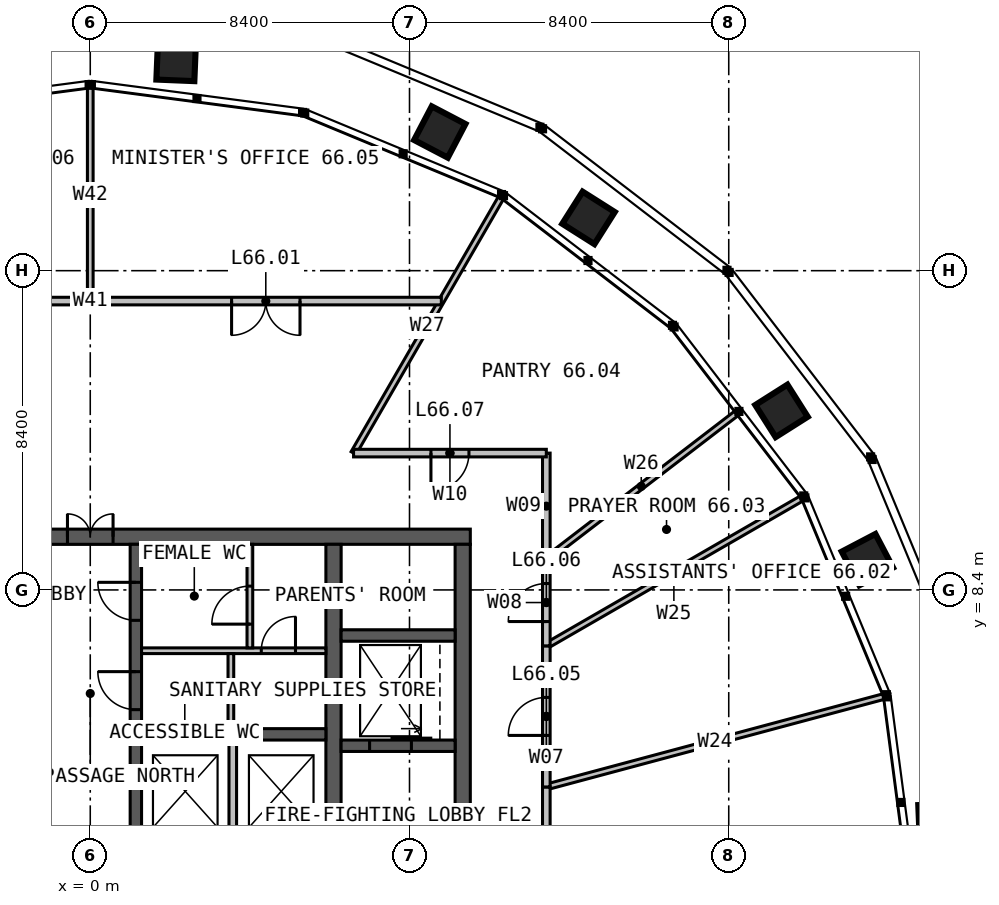
"""IFC4 building model, lengths in metres.
Left out: names, types, materials, properties, quantities, classifications, styles, units other than length and angle.
Written with IfcOpenShell. Run it as: python <this file> out.ifc"""

import sys

from ifc_helpers import new_model, si_unit, direction, frame, frame_2d, origin, place, context, subcontext, project, spatial, rectangle, extrude, element, fill, save


model = new_model("IFC4")
c1 = context("Model", 3, precision=1e-05, world=origin(), true_north=direction((0.0, 1.0)))
c2 = subcontext(c1, "Body", "Model", "MODEL_VIEW")
j1 = project(units=[si_unit("LENGTHUNIT", "METRE"), si_unit("PLANEANGLEUNIT", "RADIAN")], contexts=[c1])
p1 = place(None, origin())
s1 = spatial("IfcSite", under=j1, at=p1, CompositionType="ELEMENT")
p2 = place(p1, origin())
s2 = spatial("IfcBuilding", under=s1, at=p2, CompositionType="ELEMENT")
p3 = place(p2, frame((0.0, 0.0, 272.0)))
s3 = spatial("IfcBuildingStorey", under=s2, at=p3, CompositionType="ELEMENT", Elevation=272.0)
p4 = place(p3, frame((-10.0, 9.8, 0.0), z_axis=(0.0, 0.0, 1.0), x_axis=(1.0, 0.0, 0.0)))
e1 = element("IfcWall", 1, at=p4, inside=s3, PredefinedType="SOLIDWALL", context=c2, shape_type="SweptSolid", body=[
    extrude(rectangle(XDim=20.0, YDim=0.4, at=frame_2d((10.0, 0.0))), origin(), (0.0, 0.0, 1.0), 4.0),
])
p5 = place(p4, frame((9.4, 0.0, 0.0)))
e2 = element("IfcOpeningElement", 2, at=p5, cuts=e1, PredefinedType="OPENING", context=c2, shape_type="SweptSolid", body=[
    extrude(rectangle(XDim=1.2, YDim=2.2, at=frame_2d((0.6, 1.1))), frame((0.0, 0.21, 0.0), z_axis=(0.0, -1.0, 0.0), x_axis=(1.0, 0.0, 0.0)), (0.0, 0.0, 1.0), 0.42),
])
p6 = place(p3, frame((9.8, -9.6, 0.0), z_axis=(0.0, 0.0, 1.0), x_axis=(0.0, 1.0, 0.0)))
e3 = element("IfcWall", 3, at=p6, inside=s3, PredefinedType="SOLIDWALL", context=c2, shape_type="SweptSolid", body=[
    extrude(rectangle(XDim=19.2, YDim=0.4, at=frame_2d((9.6, 0.0))), origin(), (0.0, 0.0, 1.0), 4.0),
])
p7 = place(p3, frame((6.4, 9.6, 0.0), z_axis=(0.0, 0.0, 1.0), x_axis=(0.0, -1.0, 0.0)))
e4 = element("IfcWall", 4, at=p7, inside=s3, PredefinedType="SOLIDWALL", context=c2, shape_type="SweptSolid", body=[
    extrude(rectangle(XDim=19.2, YDim=0.4, at=frame_2d((9.6, 0.0))), origin(), (0.0, 0.0, 1.0), 4.0),
])
p8 = place(p7, frame((9.1, 0.0, 0.0)))
e5 = element("IfcOpeningElement", 5, at=p8, cuts=e4, PredefinedType="OPENING", context=c2, shape_type="SweptSolid", body=[
    extrude(rectangle(XDim=1.0, YDim=2.2, at=frame_2d((0.5, 1.1))), frame((0.0, 0.21, 0.0), z_axis=(0.0, -1.0, 0.0), x_axis=(1.0, 0.0, 0.0)), (0.0, 0.0, 1.0), 0.42),
])
p9 = place(p3, frame((1.35, 4.6, 0.0), z_axis=(0.0, 0.0, 1.0), x_axis=(1.0, 0.0, 0.0)))
e6 = element("IfcWall", 6, at=p9, inside=s3, PredefinedType="SOLIDWALL", context=c2, shape_type="SweptSolid", body=[
    extrude(rectangle(XDim=4.85, YDim=0.3, at=frame_2d((2.425, 0.0))), origin(), (0.0, 0.0, 1.0), 4.0),
])
p10 = place(p3, frame((1.2, 1.45, 0.0), z_axis=(0.0, 0.0, 1.0), x_axis=(0.0, 1.0, 0.0)))
e7 = element("IfcWall", 7, at=p10, inside=s3, PredefinedType="SOLIDWALL", context=c2, shape_type="SweptSolid", body=[
    extrude(rectangle(XDim=8.15, YDim=0.3, at=frame_2d((4.075, 0.0))), origin(), (0.0, 0.0, 1.0), 4.0),
])
p11 = place(p10, frame((3.8, 0.0, 0.0)))
e8 = element("IfcOpeningElement", 8, at=p11, cuts=e7, PredefinedType="OPENING", context=c2, shape_type="SweptSolid", body=[
    extrude(rectangle(XDim=1.0, YDim=2.2, at=frame_2d((0.5, 1.1))), frame((0.0, 0.16, 0.0), z_axis=(0.0, -1.0, 0.0), x_axis=(1.0, 0.0, 0.0)), (0.0, 0.0, 1.0), 0.32),
])
p12 = place(p10, frame((6.15, 0.0, 0.0)))
e9 = element("IfcOpeningElement", 9, at=p12, cuts=e7, PredefinedType="OPENING", context=c2, shape_type="SweptSolid", body=[
    extrude(rectangle(XDim=1.0, YDim=2.2, at=frame_2d((0.5, 1.1))), frame((0.0, 0.16, 0.0), z_axis=(0.0, -1.0, 0.0), x_axis=(1.0, 0.0, 0.0)), (0.0, 0.0, 1.0), 0.32),
])
p13 = place(p3, frame((6.6, 4.3, 0.0), z_axis=(0.0, 0.0, 1.0), x_axis=(1.0, 0.0, 0.0)))
e10 = element("IfcWall", 10, at=p13, inside=s3, PredefinedType="SOLIDWALL", context=c2, shape_type="SweptSolid", body=[
    extrude(rectangle(XDim=3.0, YDim=0.3, at=frame_2d((1.5, 0.0))), origin(), (0.0, 0.0, 1.0), 4.0),
])
p14 = place(p13, frame((0.75, 0.0, 0.0)))
e11 = element("IfcOpeningElement", 11, at=p14, cuts=e10, PredefinedType="OPENING", context=c2, shape_type="SweptSolid", body=[
    extrude(rectangle(XDim=1.1, YDim=2.2, at=frame_2d((0.55, 1.1))), frame((0.0, 0.16, 0.0), z_axis=(0.0, -1.0, 0.0), x_axis=(1.0, 0.0, 0.0)), (0.0, 0.0, 1.0), 0.32),
])
p15 = place(p3, frame((6.6, 7.2, 0.0), z_axis=(0.0, 0.0, 1.0), x_axis=(1.0, 0.0, 0.0)))
e12 = element("IfcWall", 12, at=p15, inside=s3, PredefinedType="SOLIDWALL", context=c2, shape_type="SweptSolid", body=[
    extrude(rectangle(XDim=3.0, YDim=0.3, at=frame_2d((1.5, 0.0))), origin(), (0.0, 0.0, 1.0), 4.0),
])
p16 = place(p3, frame((3.75, 1.75, 0.0), z_axis=(0.0, 0.0, 1.0), x_axis=(0.0, 1.0, 0.0)))
e13 = element("IfcWall", 13, at=p16, inside=s3, PredefinedType="SOLIDWALL", context=c2, shape_type="SweptSolid", body=[
    extrude(rectangle(XDim=2.7, YDim=0.2, at=frame_2d((1.35, 0.0))), origin(), (0.0, 0.0, 1.0), 3.75),
])
p17 = place(p3, frame((1.35, 6.8, 0.0), z_axis=(0.0, 0.0, 1.0), x_axis=(1.0, 0.0, 0.0)))
e14 = element("IfcWall", 14, at=p17, inside=s3, PredefinedType="PARTITIONING", context=c2, shape_type="SweptSolid", body=[
    extrude(rectangle(XDim=4.85, YDim=0.15, at=frame_2d((2.425, 0.0))), origin(), (0.0, 0.0, 1.0), 3.75),
])
p18 = place(p17, frame((3.15, 0.0, 0.0)))
e15 = element("IfcOpeningElement", 15, at=p18, cuts=e14, PredefinedType="OPENING", context=c2, shape_type="SweptSolid", body=[
    extrude(rectangle(XDim=0.9, YDim=2.2, at=frame_2d((0.45, 1.1))), frame((0.0, 0.085, 0.0), z_axis=(0.0, -1.0, 0.0), x_axis=(1.0, 0.0, 0.0)), (0.0, 0.0, 1.0), 0.17),
])
p19 = place(p3, frame((3.7, 4.75, 0.0), z_axis=(0.0, 0.0, 1.0), x_axis=(0.0, 1.0, 0.0)))
e16 = element("IfcWall", 16, at=p19, inside=s3, PredefinedType="PARTITIONING", context=c2, shape_type="SweptSolid", body=[
    extrude(rectangle(XDim=1.975, YDim=0.15, at=frame_2d((0.988, 0.0))), origin(), (0.0, 0.0, 1.0), 3.75),
])
p20 = place(p3, frame((4.2, 6.875, 0.0), z_axis=(0.0, 0.0, 1.0), x_axis=(0.0, 1.0, 0.0)))
e17 = element("IfcWall", 17, at=p20, inside=s3, PredefinedType="PARTITIONING", context=c2, shape_type="SweptSolid", body=[
    extrude(rectangle(XDim=2.725, YDim=0.15, at=frame_2d((1.363, 0.0))), origin(), (0.0, 0.0, 1.0), 3.75),
])
p21 = place(p20, frame((0.625, 0.0, 0.0)))
e18 = element("IfcOpeningElement", 18, at=p21, cuts=e17, PredefinedType="OPENING", context=c2, shape_type="SweptSolid", body=[
    extrude(rectangle(XDim=1.0, YDim=2.2, at=frame_2d((0.5, 1.1))), frame((0.0, 0.085, 0.0), z_axis=(0.0, -1.0, 0.0), x_axis=(1.0, 0.0, 0.0)), (0.0, 0.0, 1.0), 0.17),
])
p22 = place(p3, frame((12.0, 3.215, 0.0), z_axis=(0.0, 0.0, 1.0), x_axis=(0.965925864192, 0.258818903647, 0.0)))
e19 = element("IfcWall", 19, at=p22, inside=s3, PredefinedType="PARTITIONING", context=c2, shape_type="SweptSolid", body=[
    extrude(rectangle(XDim=9.185, YDim=0.15, at=frame_2d((4.592, 0.0))), origin(), (0.0, 0.0, 1.0), 2.79),
])
p23 = place(p3, frame((12.0, 6.928, 0.0), z_axis=(0.0, 0.0, 1.0), x_axis=(0.866025099701, 0.500000526688, 0.0)))
e20 = element("IfcWall", 20, at=p23, inside=s3, PredefinedType="PARTITIONING", context=c2, shape_type="SweptSolid", body=[
    extrude(rectangle(XDim=7.752, YDim=0.15, at=frame_2d((3.876, 0.0))), origin(), (0.0, 0.0, 1.0), 2.79),
])
p24 = place(p3, frame((12.0, 9.208, 0.0), z_axis=(0.0, 0.0, 1.0), x_axis=(0.793359833503, 0.608752966797, 0.0)))
e21 = element("IfcWall", 21, at=p24, inside=s3, PredefinedType="PARTITIONING", context=c2, shape_type="SweptSolid", body=[
    extrude(rectangle(XDim=6.298, YDim=0.15, at=frame_2d((3.149, 0.0))), origin(), (0.0, 0.0, 1.0), 2.79),
])
p25 = place(p3, frame((6.928, 12.0, 0.0), z_axis=(0.0, 0.0, 1.0), x_axis=(0.500000526688, 0.866025099701, 0.0)))
e22 = element("IfcWall", 22, at=p25, inside=s3, PredefinedType="PARTITIONING", context=c2, shape_type="SweptSolid", body=[
    extrude(rectangle(XDim=7.752, YDim=0.15, at=frame_2d((3.876, 0.0))), origin(), (0.0, 0.0, 1.0), 2.79),
])
p26 = place(p3, frame((12.0, -6.928, 0.0), z_axis=(0.0, 0.0, 1.0), x_axis=(0.0, 1.0, 0.0)))
e23 = element("IfcWall", 23, at=p26, inside=s3, PredefinedType="PARTITIONING", context=c2, shape_type="SweptSolid", body=[
    extrude(rectangle(XDim=10.144, YDim=0.2, at=frame_2d((5.072, 0.0))), origin(), (0.0, 0.0, 1.0), 3.8),
])
p27 = place(p26, frame((4.172, 0.0, 0.0)))
e24 = element("IfcOpeningElement", 24, at=p27, cuts=e23, PredefinedType="OPENING", context=c2, shape_type="SweptSolid", body=[
    extrude(rectangle(XDim=1.8, YDim=2.2, at=frame_2d((0.9, 1.1))), frame((0.0, 0.11, 0.0), z_axis=(0.0, -1.0, 0.0), x_axis=(1.0, 0.0, 0.0)), (0.0, 0.0, 1.0), 0.22),
])
p28 = place(p3, frame((12.0, 3.215, 0.0), z_axis=(0.0, 0.0, 1.0), x_axis=(0.0, 1.0, 0.0)))
e25 = element("IfcWall", 25, at=p28, inside=s3, PredefinedType="PARTITIONING", context=c2, shape_type="SweptSolid", body=[
    extrude(rectangle(XDim=3.713, YDim=0.2, at=frame_2d((1.856, 0.0))), origin(), (0.0, 0.0, 1.0), 3.8),
])
p29 = place(p28, frame((1.356, 0.0, 0.0)))
e26 = element("IfcOpeningElement", 26, at=p29, cuts=e25, PredefinedType="OPENING", context=c2, shape_type="SweptSolid", body=[
    extrude(rectangle(XDim=1.0, YDim=2.2, at=frame_2d((0.5, 1.1))), frame((0.0, 0.11, 0.0), z_axis=(0.0, -1.0, 0.0), x_axis=(1.0, 0.0, 0.0)), (0.0, 0.0, 1.0), 0.22),
])
p30 = place(p3, frame((12.0, 6.928, 0.0), z_axis=(0.0, 0.0, 1.0), x_axis=(0.0, 1.0, 0.0)))
e27 = element("IfcWall", 27, at=p30, inside=s3, PredefinedType="PARTITIONING", context=c2, shape_type="SweptSolid", body=[
    extrude(rectangle(XDim=2.28, YDim=0.2, at=frame_2d((1.14, 0.0))), origin(), (0.0, 0.0, 1.0), 3.8),
])
p31 = place(p30, frame((0.64, 0.0, 0.0)))
e28 = element("IfcOpeningElement", 28, at=p31, cuts=e27, PredefinedType="OPENING", context=c2, shape_type="SweptSolid", body=[
    extrude(rectangle(XDim=1.0, YDim=2.2, at=frame_2d((0.5, 1.1))), frame((0.0, 0.11, 0.0), z_axis=(0.0, -1.0, 0.0), x_axis=(1.0, 0.0, 0.0)), (0.0, 0.0, 1.0), 0.22),
])
p32 = place(p3, frame((12.0, 9.208, 0.0), z_axis=(0.0, 0.0, 1.0), x_axis=(0.0, 1.0, 0.0)))
e29 = element("IfcWall", 29, at=p32, inside=s3, PredefinedType="PARTITIONING", context=c2, shape_type="SweptSolid", body=[
    extrude(rectangle(XDim=2.792, YDim=0.2, at=frame_2d((1.396, 0.0))), origin(), (0.0, 0.0, 1.0), 3.8),
])
p33 = place(p3, frame((12.0, 12.0, 0.0), z_axis=(0.0, 0.0, 1.0), x_axis=(-1.0, 0.0, 0.0)))
e30 = element("IfcWall", 30, at=p33, inside=s3, PredefinedType="PARTITIONING", context=c2, shape_type="SweptSolid", body=[
    extrude(rectangle(XDim=5.072, YDim=0.2, at=frame_2d((2.536, 0.0))), origin(), (0.0, 0.0, 1.0), 3.8),
])
p34 = place(p33, frame((2.036, 0.0, 0.0)))
e31 = element("IfcOpeningElement", 31, at=p34, cuts=e30, PredefinedType="OPENING", context=c2, shape_type="SweptSolid", body=[
    extrude(rectangle(XDim=1.0, YDim=2.2, at=frame_2d((0.5, 1.1))), frame((0.0, 0.11, 0.0), z_axis=(0.0, -1.0, 0.0), x_axis=(1.0, 0.0, 0.0)), (0.0, 0.0, 1.0), 0.22),
])
p35 = place(p3, frame((9.238, 16.0, 0.0), z_axis=(0.0, 0.0, 1.0), x_axis=(-1.0, 0.0, 0.0)))
e32 = element("IfcWall", 32, at=p35, inside=s3, PredefinedType="PARTITIONING", context=c2, shape_type="SweptSolid", body=[
    extrude(rectangle(XDim=18.475, YDim=0.2, at=frame_2d((9.238, 0.0))), origin(), (0.0, 0.0, 1.0), 3.8),
])
p36 = place(p35, frame((3.719, 0.0, 0.0)))
e33 = element("IfcOpeningElement", 33, at=p36, cuts=e32, PredefinedType="OPENING", context=c2, shape_type="SweptSolid", body=[
    extrude(rectangle(XDim=1.8, YDim=2.2, at=frame_2d((0.9, 1.1))), frame((0.0, 0.11, 0.0), z_axis=(0.0, -1.0, 0.0), x_axis=(1.0, 0.0, 0.0)), (0.0, 0.0, 1.0), 0.22),
])
p37 = place(p35, frame((12.956, 0.0, 0.0)))
e34 = element("IfcOpeningElement", 34, at=p37, cuts=e32, PredefinedType="OPENING", context=c2, shape_type="SweptSolid", body=[
    extrude(rectangle(XDim=1.8, YDim=2.2, at=frame_2d((0.9, 1.1))), frame((0.0, 0.11, 0.0), z_axis=(0.0, -1.0, 0.0), x_axis=(1.0, 0.0, 0.0)), (0.0, 0.0, 1.0), 0.22),
])
p38 = place(p3, frame((0.0, 16.0, 0.0), z_axis=(0.0, 0.0, 1.0), x_axis=(0.0, 1.0, 0.0)))
e35 = element("IfcWall", 35, at=p38, inside=s3, PredefinedType="PARTITIONING", context=c2, shape_type="SweptSolid", body=[
    extrude(rectangle(XDim=5.608, YDim=0.15, at=frame_2d((2.804, 0.0))), origin(), (0.0, 0.0, 1.0), 2.79),
])
p39 = place(p5, origin())
e36 = element("IfcDoor", 36, at=p39, inside=s3, OperationType="DOUBLE_DOOR_SINGLE_SWING", PredefinedType="DOOR", context=c2, shape_type="SweptSolid", body=[
    extrude(rectangle(XDim=1.2, YDim=2.2, at=frame_2d((0.6, 1.1))), frame((0.0, 0.025, 0.0), z_axis=(0.0, -1.0, 0.0), x_axis=(1.0, 0.0, 0.0)), (0.0, 0.0, 1.0), 0.05),
])
fill(e2, e36)
p40 = place(p11, origin())
e37 = element("IfcDoor", 37, at=p40, inside=s3, OperationType="SINGLE_SWING_RIGHT", PredefinedType="DOOR", context=c2, shape_type="SweptSolid", body=[
    extrude(rectangle(XDim=1.0, YDim=2.2, at=frame_2d((0.5, 1.1))), frame((0.0, 0.025, 0.0), z_axis=(0.0, -1.0, 0.0), x_axis=(1.0, 0.0, 0.0)), (0.0, 0.0, 1.0), 0.05),
])
fill(e8, e37)
p41 = place(p12, origin())
e38 = element("IfcDoor", 38, at=p41, inside=s3, OperationType="SINGLE_SWING_RIGHT", PredefinedType="DOOR", context=c2, shape_type="SweptSolid", body=[
    extrude(rectangle(XDim=1.0, YDim=2.2, at=frame_2d((0.5, 1.1))), frame((0.0, 0.025, 0.0), z_axis=(0.0, -1.0, 0.0), x_axis=(1.0, 0.0, 0.0)), (0.0, 0.0, 1.0), 0.05),
])
fill(e9, e38)
p42 = place(p18, origin())
e39 = element("IfcDoor", 39, at=p42, inside=s3, OperationType="SINGLE_SWING_RIGHT", PredefinedType="DOOR", context=c2, shape_type="SweptSolid", body=[
    extrude(rectangle(XDim=0.9, YDim=2.2, at=frame_2d((0.45, 1.1))), frame((0.0, 0.025, 0.0), z_axis=(0.0, -1.0, 0.0), x_axis=(1.0, 0.0, 0.0)), (0.0, 0.0, 1.0), 0.05),
])
fill(e15, e39)
p43 = place(p21, origin())
e40 = element("IfcDoor", 40, at=p43, inside=s3, OperationType="SINGLE_SWING_LEFT", PredefinedType="DOOR", context=c2, shape_type="SweptSolid", body=[
    extrude(rectangle(XDim=1.0, YDim=2.2, at=frame_2d((0.5, 1.1))), frame((0.0, 0.025, 0.0), z_axis=(0.0, -1.0, 0.0), x_axis=(1.0, 0.0, 0.0)), (0.0, 0.0, 1.0), 0.05),
])
fill(e18, e40)
p44 = place(p14, origin())
e41 = element("IfcDoor", 41, at=p44, inside=s3, OperationType="SLIDING_TO_LEFT", PredefinedType="DOOR", context=c2, shape_type="SweptSolid", body=[
    extrude(rectangle(XDim=1.1, YDim=2.2, at=frame_2d((0.55, 1.1))), frame((0.0, 0.025, 0.0), z_axis=(0.0, -1.0, 0.0), x_axis=(1.0, 0.0, 0.0)), (0.0, 0.0, 1.0), 0.05),
])
fill(e11, e41)
p45 = place(p29, origin())
e42 = element("IfcDoor", 42, at=p45, inside=s3, OperationType="SINGLE_SWING_LEFT", PredefinedType="DOOR", context=c2, shape_type="SweptSolid", body=[
    extrude(rectangle(XDim=1.0, YDim=2.2, at=frame_2d((0.5, 1.1))), frame((0.0, 0.025, 0.0), z_axis=(0.0, -1.0, 0.0), x_axis=(1.0, 0.0, 0.0)), (0.0, 0.0, 1.0), 0.05),
])
fill(e26, e42)
p46 = place(p31, origin())
e43 = element("IfcDoor", 43, at=p46, inside=s3, OperationType="SINGLE_SWING_LEFT", PredefinedType="DOOR", context=c2, shape_type="SweptSolid", body=[
    extrude(rectangle(XDim=1.0, YDim=2.2, at=frame_2d((0.5, 1.1))), frame((0.0, 0.025, 0.0), z_axis=(0.0, -1.0, 0.0), x_axis=(1.0, 0.0, 0.0)), (0.0, 0.0, 1.0), 0.05),
])
fill(e28, e43)
p47 = place(p34, origin())
e44 = element("IfcDoor", 44, at=p47, inside=s3, OperationType="SINGLE_SWING_RIGHT", PredefinedType="DOOR", context=c2, shape_type="SweptSolid", body=[
    extrude(rectangle(XDim=1.0, YDim=2.2, at=frame_2d((0.5, 1.1))), frame((0.0, 0.025, 0.0), z_axis=(0.0, -1.0, 0.0), x_axis=(1.0, 0.0, 0.0)), (0.0, 0.0, 1.0), 0.05),
])
fill(e31, e44)
p48 = place(p36, origin())
e45 = element("IfcDoor", 45, at=p48, inside=s3, OperationType="DOUBLE_DOOR_SINGLE_SWING", PredefinedType="DOOR", context=c2, shape_type="SweptSolid", body=[
    extrude(rectangle(XDim=1.8, YDim=2.2, at=frame_2d((0.9, 1.1))), frame((0.0, 0.025, 0.0), z_axis=(0.0, -1.0, 0.0), x_axis=(1.0, 0.0, 0.0)), (0.0, 0.0, 1.0), 0.05),
])
fill(e33, e45)
save(model, sys.argv[1])
